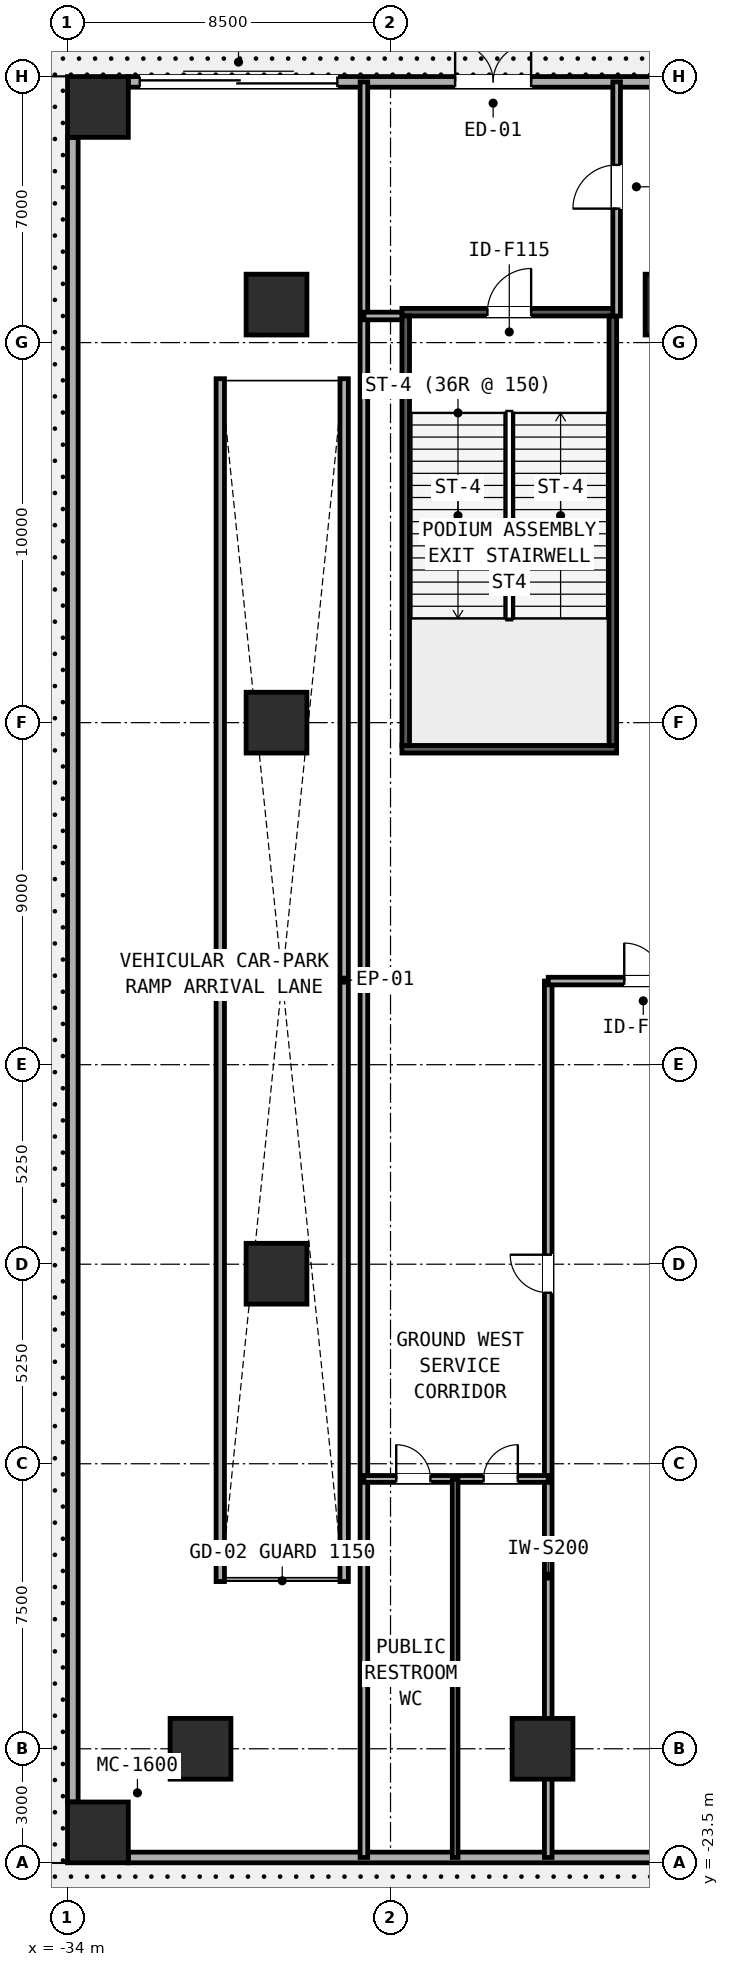
"""IFC4 building model, lengths in metres.
Left out: names, types, materials, properties, quantities, classifications, styles, units other than length and angle.
Written with IfcOpenShell. Run it as: python <this file> out.ifc"""

import sys

from ifc_helpers import new_model, si_unit, direction, frame, frame_2d, origin, origin_2d, place, context, subcontext, project, spatial, rectangle, extrude, element, fill, save


model = new_model("IFC4")
c1 = context("Model", 3, precision=1e-05, world=origin(), true_north=direction((0.0, 1.0)))
c2 = subcontext(c1, "Body", "Model", "MODEL_VIEW")
j1 = project(units=[si_unit("LENGTHUNIT", "METRE"), si_unit("PLANEANGLEUNIT", "RADIAN")], contexts=[c1])
p1 = place(None, origin())
s1 = spatial("IfcSite", under=j1, at=p1, CompositionType="ELEMENT")
p2 = place(p1, origin())
s2 = spatial("IfcBuilding", under=s1, at=p2, CompositionType="ELEMENT")
p3 = place(p2, origin())
s3 = spatial("IfcBuildingStorey", under=s2, at=p3, CompositionType="ELEMENT", Elevation=0.0)
p4 = place(p3, frame((-25.2, 5.8, 0.0), z_axis=(0.0, 0.0, 1.0), x_axis=(1.0, 0.0, 0.0)))
e1 = element("IfcWall", 1, at=p4, inside=s3, PredefinedType="SOLIDWALL", context=c2, shape_type="SweptSolid", body=[
    extrude(rectangle(XDim=5.65, YDim=0.2, at=frame_2d((2.825, 0.0))), origin(), (0.0, 0.0, 1.0), 5.1),
])
p5 = place(p3, frame((-25.2, 17.3, 0.0), z_axis=(0.0, 0.0, 1.0), x_axis=(1.0, 0.0, 0.0)))
e2 = element("IfcWall", 2, at=p5, inside=s3, PredefinedType="SOLIDWALL", context=c2, shape_type="SweptSolid", body=[
    extrude(rectangle(XDim=5.65, YDim=0.2, at=frame_2d((2.825, 0.0))), origin(), (0.0, 0.0, 1.0), 5.1),
])
p6 = place(p5, frame((2.25, 0.0, 0.0)))
e3 = element("IfcOpeningElement", 3, at=p6, cuts=e2, PredefinedType="OPENING", context=c2, shape_type="SweptSolid", body=[
    extrude(rectangle(XDim=1.15, YDim=2.2, at=frame_2d((0.575, 1.1))), frame((0.0, 0.11, 0.0), z_axis=(0.0, -1.0, 0.0), x_axis=(1.0, 0.0, 0.0)), (0.0, 0.0, 1.0), 0.22),
])
for number, where, z_axis, x_axis in (
    (4, (-25.1, 5.9, 0.0), (0.0, 0.0, 1.0), (0.0, 1.0, 0.0)),
    (5, (-19.65, 5.9, 0.0), (0.0, 0.0, 1.0), (0.0, 1.0, 0.0)),
):
    element("IfcWall", number, at=place(p3, frame(where, z_axis=z_axis, x_axis=x_axis)), inside=s3, PredefinedType="SOLIDWALL", context=c2, shape_type="SweptSolid", body=[
        extrude(rectangle(XDim=11.3, YDim=0.2, at=frame_2d((5.65, 0.0))), origin(), (0.0, 0.0, 1.0), 5.1),
    ])
for number, where, z_axis, x_axis in (
    (6, (-33.2, -22.7, 0.0), (0.0, 0.0, 1.0), (1.0, 0.0, 0.0)),
    (7, (-33.2, 22.7, 0.0), (0.0, 0.0, 1.0), (1.0, 0.0, 0.0)),
    (8, (-30.5, -20.5, 0.0), (0.0, 0.0, 1.0), (1.0, 0.0, 0.0)),
    (9, (-21.5, -20.5, 0.0), (0.0, 0.0, 1.0), (1.0, 0.0, 0.0)),
    (10, (-28.5, -8.0, 0.0), (0.0, 0.0, 1.0), (1.0, 0.0, 0.0)),
    (11, (-28.5, 6.5, 0.0), (0.0, 0.0, 1.0), (1.0, 0.0, 0.0)),
    (12, (-28.5, 17.5, 0.0), (0.0, 0.0, 1.0), (1.0, 0.0, 0.0)),
    (13, (-18.0, 17.5, 0.0), (0.0, 0.0, 1.0), (1.0, 0.0, 0.0)),
):
    element("IfcColumn", number, at=place(p3, frame(where, z_axis=z_axis, x_axis=x_axis)), inside=s3, PredefinedType="COLUMN", context=c2, shape_type="SweptSolid", body=[
        extrude(rectangle(XDim=1.6, YDim=1.6, at=origin_2d()), origin(), (0.0, 0.0, 1.0), 5.4),
    ])
p7 = place(p3, frame((-32.4, -23.36, 0.0), z_axis=(0.0, 0.0, 1.0), x_axis=(1.0, 0.0, 0.0)))
e14 = element("IfcWall", 14, at=p7, inside=s3, PredefinedType="STANDARD", context=c2, shape_type="SweptSolid", body=[
    extrude(rectangle(XDim=64.8, YDim=0.28, at=frame_2d((32.4, 0.0))), origin(), (0.0, 0.0, 1.0), 5.1),
])
p8 = place(p7, frame((16.9, 0.0, 0.0)))
e15 = element("IfcOpeningElement", 15, at=p8, cuts=e14, PredefinedType="OPENING", context=c2, shape_type="SweptSolid", body=[
    extrude(rectangle(XDim=2.0, YDim=2.35, at=frame_2d((1.0, 1.175))), frame((0.0, 0.15, 0.0), z_axis=(0.0, -1.0, 0.0), x_axis=(1.0, 0.0, 0.0)), (0.0, 0.0, 1.0), 0.3),
])
p9 = place(p7, frame((45.9, 0.0, 0.0)))
e16 = element("IfcOpeningElement", 16, at=p9, cuts=e14, PredefinedType="OPENING", context=c2, shape_type="SweptSolid", body=[
    extrude(rectangle(XDim=2.0, YDim=2.35, at=frame_2d((1.0, 1.175))), frame((0.0, 0.15, 0.0), z_axis=(0.0, -1.0, 0.0), x_axis=(1.0, 0.0, 0.0)), (0.0, 0.0, 1.0), 0.3),
])
p10 = place(p3, frame((-32.4, 23.36, 0.0), z_axis=(0.0, 0.0, 1.0), x_axis=(1.0, 0.0, 0.0)))
e17 = element("IfcWall", 17, at=p10, inside=s3, PredefinedType="STANDARD", context=c2, shape_type="SweptSolid", body=[
    extrude(rectangle(XDim=64.8, YDim=0.28, at=frame_2d((32.4, 0.0))), origin(), (0.0, 0.0, 1.0), 5.1),
])
p11 = place(p10, frame((8.6, 0.0, 0.0)))
e18 = element("IfcOpeningElement", 18, at=p11, cuts=e17, PredefinedType="OPENING", context=c2, shape_type="SweptSolid", body=[
    extrude(rectangle(XDim=2.0, YDim=2.35, at=frame_2d((1.0, 1.175))), frame((0.0, 0.15, 0.0), z_axis=(0.0, -1.0, 0.0), x_axis=(1.0, 0.0, 0.0)), (0.0, 0.0, 1.0), 0.3),
])
p12 = place(p10, frame((26.9, 0.0, 0.0)))
e19 = element("IfcOpeningElement", 19, at=p12, cuts=e17, PredefinedType="OPENING", context=c2, shape_type="SweptSolid", body=[
    extrude(rectangle(XDim=2.0, YDim=2.35, at=frame_2d((1.0, 1.175))), frame((0.0, 0.15, 0.0), z_axis=(0.0, -1.0, 0.0), x_axis=(1.0, 0.0, 0.0)), (0.0, 0.0, 1.0), 0.3),
])
p13 = place(p10, frame((35.9, 0.0, 0.0)))
e20 = element("IfcOpeningElement", 20, at=p13, cuts=e17, PredefinedType="OPENING", context=c2, shape_type="SweptSolid", body=[
    extrude(rectangle(XDim=2.0, YDim=2.35, at=frame_2d((1.0, 1.175))), frame((0.0, 0.15, 0.0), z_axis=(0.0, -1.0, 0.0), x_axis=(1.0, 0.0, 0.0)), (0.0, 0.0, 1.0), 0.3),
])
p14 = place(p10, frame((47.9, 0.0, 0.0)))
e21 = element("IfcOpeningElement", 21, at=p14, cuts=e17, PredefinedType="OPENING", context=c2, shape_type="SweptSolid", body=[
    extrude(rectangle(XDim=2.0, YDim=2.35, at=frame_2d((1.0, 1.175))), frame((0.0, 0.15, 0.0), z_axis=(0.0, -1.0, 0.0), x_axis=(1.0, 0.0, 0.0)), (0.0, 0.0, 1.0), 0.3),
])
p15 = place(p10, frame((61.2, 0.0, 0.0)))
e22 = element("IfcOpeningElement", 22, at=p15, cuts=e17, PredefinedType="OPENING", context=c2, shape_type="SweptSolid", body=[
    extrude(rectangle(XDim=2.0, YDim=2.35, at=frame_2d((1.0, 1.175))), frame((0.0, 0.15, 0.0), z_axis=(0.0, -1.0, 0.0), x_axis=(1.0, 0.0, 0.0)), (0.0, 0.0, 1.0), 0.3),
])
p16 = place(p10, frame((0.3, 0.0, 0.0)))
e23 = element("IfcOpeningElement", 23, at=p16, cuts=e17, PredefinedType="OPENING", context=c2, shape_type="SweptSolid", body=[
    extrude(rectangle(XDim=5.2, YDim=3.1, at=frame_2d((2.6, 1.55))), frame((0.0, 0.15, 0.0), z_axis=(0.0, -1.0, 0.0), x_axis=(1.0, 0.0, 0.0)), (0.0, 0.0, 1.0), 0.3),
])
p17 = place(p10, frame((16.2, 0.0, 0.85)))
e24 = element("IfcOpeningElement", 24, at=p17, cuts=e17, PredefinedType="OPENING", context=c2, shape_type="SweptSolid", body=[
    extrude(rectangle(XDim=2.4, YDim=2.1, at=frame_2d((1.2, 1.05))), frame((0.0, 0.15, 0.0), z_axis=(0.0, -1.0, 0.0), x_axis=(1.0, 0.0, 0.0)), (0.0, 0.0, 1.0), 0.3),
])
p18 = place(p10, frame((31.2, 0.0, 0.85)))
e25 = element("IfcOpeningElement", 25, at=p18, cuts=e17, PredefinedType="OPENING", context=c2, shape_type="SweptSolid", body=[
    extrude(rectangle(XDim=2.4, YDim=2.1, at=frame_2d((1.2, 1.05))), frame((0.0, 0.15, 0.0), z_axis=(0.0, -1.0, 0.0), x_axis=(1.0, 0.0, 0.0)), (0.0, 0.0, 1.0), 0.3),
])
p19 = place(p10, frame((40.7, 0.0, 0.85)))
e26 = element("IfcOpeningElement", 26, at=p19, cuts=e17, PredefinedType="OPENING", context=c2, shape_type="SweptSolid", body=[
    extrude(rectangle(XDim=2.4, YDim=2.1, at=frame_2d((1.2, 1.05))), frame((0.0, 0.15, 0.0), z_axis=(0.0, -1.0, 0.0), x_axis=(1.0, 0.0, 0.0)), (0.0, 0.0, 1.0), 0.3),
])
p20 = place(p10, frame((54.7, 0.0, 0.85)))
e27 = element("IfcOpeningElement", 27, at=p20, cuts=e17, PredefinedType="OPENING", context=c2, shape_type="SweptSolid", body=[
    extrude(rectangle(XDim=2.4, YDim=2.1, at=frame_2d((1.2, 1.05))), frame((0.0, 0.15, 0.0), z_axis=(0.0, -1.0, 0.0), x_axis=(1.0, 0.0, 0.0)), (0.0, 0.0, 1.0), 0.3),
])
p21 = place(p3, frame((-33.86, -21.9, 0.0), z_axis=(0.0, 0.0, 1.0), x_axis=(0.0, 1.0, 0.0)))
e28 = element("IfcWall", 28, at=p21, inside=s3, PredefinedType="STANDARD", context=c2, shape_type="SweptSolid", body=[
    extrude(rectangle(XDim=43.8, YDim=0.28, at=frame_2d((21.9, 0.0))), origin(), (0.0, 0.0, 1.0), 5.1),
])
for number, where, z_axis, x_axis in (
    (29, (-29.98, -16.1, 0.0), (0.0, 0.0, 1.0), (0.0, 1.0, 0.0)),
    (30, (-26.72, -16.1, 0.0), (0.0, 0.0, 1.0), (0.0, 1.0, 0.0)),
):
    element("IfcWall", number, at=place(p3, frame(where, z_axis=z_axis, x_axis=x_axis)), inside=s3, PredefinedType="PARAPET", context=c2, shape_type="SweptSolid", body=[
        extrude(rectangle(XDim=31.65, YDim=0.22, at=frame_2d((15.825, 0.0))), origin(), (0.0, 0.0, 1.0), 1.15),
    ])
p22 = place(p3, frame((-21.35, -23.36, 0.0), z_axis=(0.0, 0.0, 1.0), x_axis=(0.0, 1.0, 0.0)))
e31 = element("IfcWall", 31, at=p22, inside=s3, PredefinedType="PARTITIONING", context=c2, shape_type="SweptSolid", body=[
    extrude(rectangle(XDim=23.06, YDim=0.2, at=frame_2d((11.53, 0.0))), origin(), (0.0, 0.0, 1.0), 4.229),
])
p23 = place(p22, frame((14.86, 0.0, 0.0)))
e32 = element("IfcOpeningElement", 32, at=p23, cuts=e31, PredefinedType="OPENING", context=c2, shape_type="SweptSolid", body=[
    extrude(rectangle(XDim=1.0, YDim=2.1, at=frame_2d((0.5, 1.05))), frame((0.0, 0.11, 0.0), z_axis=(0.0, -1.0, 0.0), x_axis=(1.0, 0.0, 0.0)), (0.0, 0.0, 1.0), 0.22),
])
p24 = place(p3, frame((-21.35, -0.3, 0.0), z_axis=(0.0, 0.0, 1.0), x_axis=(1.0, 0.0, 0.0)))
e33 = element("IfcWall", 33, at=p24, inside=s3, PredefinedType="PARTITIONING", context=c2, shape_type="SweptSolid", body=[
    extrude(rectangle(XDim=13.3, YDim=0.2, at=frame_2d((6.65, 0.0))), origin(), (0.0, 0.0, 1.0), 4.229),
])
p25 = place(p24, frame((2.0, 0.0, 0.0)))
e34 = element("IfcOpeningElement", 34, at=p25, cuts=e33, PredefinedType="OPENING", context=c2, shape_type="SweptSolid", body=[
    extrude(rectangle(XDim=1.0, YDim=2.1, at=frame_2d((0.5, 1.05))), frame((0.0, 0.11, 0.0), z_axis=(0.0, -1.0, 0.0), x_axis=(1.0, 0.0, 0.0)), (0.0, 0.0, 1.0), 0.22),
])
p26 = place(p3, frame((-26.2, -23.36, 0.0), z_axis=(0.0, 0.0, 1.0), x_axis=(0.0, 1.0, 0.0)))
e35 = element("IfcWall", 35, at=p26, inside=s3, PredefinedType="PARTITIONING", context=c2, shape_type="SweptSolid", body=[
    extrude(rectangle(XDim=46.72, YDim=0.2, at=frame_2d((23.36, 0.0))), origin(), (0.0, 0.0, 1.0), 4.229),
])
p27 = place(p3, frame((-19.55, 17.2, 0.0), z_axis=(0.0, 0.0, 1.0), x_axis=(0.0, 1.0, 0.0)))
e36 = element("IfcWall", 36, at=p27, inside=s3, PredefinedType="PARTITIONING", context=c2, shape_type="SweptSolid", body=[
    extrude(rectangle(XDim=6.16, YDim=0.2, at=frame_2d((3.08, 0.0))), origin(), (0.0, 0.0, 1.0), 4.312),
])
p28 = place(p27, frame((2.825, 0.0, 0.0)))
e37 = element("IfcOpeningElement", 37, at=p28, cuts=e36, PredefinedType="OPENING", context=c2, shape_type="SweptSolid", body=[
    extrude(rectangle(XDim=1.15, YDim=2.2, at=frame_2d((0.575, 1.1))), frame((0.0, 0.11, 0.0), z_axis=(0.0, -1.0, 0.0), x_axis=(1.0, 0.0, 0.0)), (0.0, 0.0, 1.0), 0.22),
])
p29 = place(p3, frame((-26.2, 17.2, 0.0), z_axis=(0.0, 0.0, 1.0), x_axis=(1.0, 0.0, 0.0)))
e38 = element("IfcWall", 38, at=p29, inside=s3, PredefinedType="PARTITIONING", context=c2, shape_type="SweptSolid", body=[
    extrude(rectangle(XDim=1.0, YDim=0.2, at=frame_2d((0.5, 0.0))), origin(), (0.0, 0.0, 1.0), 4.312),
])
p30 = place(p3, frame((-26.2, -13.4, 0.0), z_axis=(0.0, 0.0, 1.0), x_axis=(1.0, 0.0, 0.0)))
e39 = element("IfcWall", 39, at=p30, inside=s3, PredefinedType="PARTITIONING", context=c2, shape_type="SweptSolid", body=[
    extrude(rectangle(XDim=4.85, YDim=0.18, at=frame_2d((2.425, 0.0))), origin(), (0.0, 0.0, 1.0), 4.55),
])
p31 = place(p30, frame((0.85, 0.0, 0.0)))
e40 = element("IfcOpeningElement", 40, at=p31, cuts=e39, PredefinedType="OPENING", context=c2, shape_type="SweptSolid", body=[
    extrude(rectangle(XDim=0.9, YDim=2.1, at=frame_2d((0.45, 1.05))), frame((0.0, 0.1, 0.0), z_axis=(0.0, -1.0, 0.0), x_axis=(1.0, 0.0, 0.0)), (0.0, 0.0, 1.0), 0.2),
])
p32 = place(p30, frame((3.15, 0.0, 0.0)))
e41 = element("IfcOpeningElement", 41, at=p32, cuts=e39, PredefinedType="OPENING", context=c2, shape_type="SweptSolid", body=[
    extrude(rectangle(XDim=0.9, YDim=2.1, at=frame_2d((0.45, 1.05))), frame((0.0, 0.1, 0.0), z_axis=(0.0, -1.0, 0.0), x_axis=(1.0, 0.0, 0.0)), (0.0, 0.0, 1.0), 0.2),
])
p33 = place(p3, frame((-23.8, -23.36, 0.0), z_axis=(0.0, 0.0, 1.0), x_axis=(0.0, 1.0, 0.0)))
e42 = element("IfcWall", 42, at=p33, inside=s3, PredefinedType="PARTITIONING", context=c2, shape_type="SweptSolid", body=[
    extrude(rectangle(XDim=9.96, YDim=0.15, at=frame_2d((4.98, 0.0))), origin(), (0.0, 0.0, 1.0), 4.312),
])
p34 = place(p11, origin())
e43 = element("IfcDoor", 43, at=p34, inside=s3, OperationType="DOUBLE_DOOR_SINGLE_SWING", PredefinedType="DOOR", context=c2, shape_type="SweptSolid", body=[
    extrude(rectangle(XDim=2.0, YDim=2.35, at=frame_2d((1.0, 1.175))), frame((0.0, 0.025, 0.0), z_axis=(0.0, -1.0, 0.0), x_axis=(1.0, 0.0, 0.0)), (0.0, 0.0, 1.0), 0.05),
])
fill(e18, e43)
p35 = place(p16, origin())
e44 = element("IfcDoor", 44, at=p35, inside=s3, OperationType="ROLLINGUP", PredefinedType="GATE", context=c2, shape_type="SweptSolid", body=[
    extrude(rectangle(XDim=5.2, YDim=3.1, at=frame_2d((2.6, 1.55))), frame((0.0, 0.025, 0.0), z_axis=(0.0, -1.0, 0.0), x_axis=(1.0, 0.0, 0.0)), (0.0, 0.0, 1.0), 0.05),
])
fill(e23, e44)
p36 = place(p6, origin())
e45 = element("IfcDoor", 45, at=p36, inside=s3, OperationType="SINGLE_SWING_RIGHT", PredefinedType="DOOR", context=c2, shape_type="SweptSolid", body=[
    extrude(rectangle(XDim=1.15, YDim=2.2, at=frame_2d((0.575, 1.1))), frame((0.0, 0.025, 0.0), z_axis=(0.0, -1.0, 0.0), x_axis=(1.0, 0.0, 0.0)), (0.0, 0.0, 1.0), 0.05),
])
fill(e3, e45)
p37 = place(p25, frame((1.0, 0.0, 0.0), z_axis=(0.0, 0.0, 1.0), x_axis=(-1.0, 0.0, 0.0)))
e46 = element("IfcDoor", 46, at=p37, inside=s3, OperationType="SINGLE_SWING_LEFT", PredefinedType="DOOR", context=c2, shape_type="SweptSolid", body=[
    extrude(rectangle(XDim=1.0, YDim=2.1, at=frame_2d((0.5, 1.05))), frame((0.0, 0.025, 0.0), z_axis=(0.0, -1.0, 0.0), x_axis=(1.0, 0.0, 0.0)), (0.0, 0.0, 1.0), 0.05),
])
fill(e34, e46)
p38 = place(p28, frame((1.15, 0.0, 0.0), z_axis=(0.0, 0.0, 1.0), x_axis=(-1.0, 0.0, 0.0)))
e47 = element("IfcDoor", 47, at=p38, inside=s3, OperationType="SINGLE_SWING_LEFT", PredefinedType="DOOR", context=c2, shape_type="SweptSolid", body=[
    extrude(rectangle(XDim=1.15, YDim=2.2, at=frame_2d((0.575, 1.1))), frame((0.0, 0.025, 0.0), z_axis=(0.0, -1.0, 0.0), x_axis=(1.0, 0.0, 0.0)), (0.0, 0.0, 1.0), 0.05),
])
fill(e37, e47)
p39 = place(p31, frame((0.9, 0.0, 0.0), z_axis=(0.0, 0.0, 1.0), x_axis=(-1.0, 0.0, 0.0)))
e48 = element("IfcDoor", 48, at=p39, inside=s3, OperationType="SINGLE_SWING_LEFT", PredefinedType="DOOR", context=c2, shape_type="SweptSolid", body=[
    extrude(rectangle(XDim=0.9, YDim=2.1, at=frame_2d((0.45, 1.05))), frame((0.0, 0.025, 0.0), z_axis=(0.0, -1.0, 0.0), x_axis=(1.0, 0.0, 0.0)), (0.0, 0.0, 1.0), 0.05),
])
fill(e40, e48)
p40 = place(p32, frame((0.9, 0.0, 0.0), z_axis=(0.0, 0.0, 1.0), x_axis=(-1.0, 0.0, 0.0)))
e49 = element("IfcDoor", 49, at=p40, inside=s3, OperationType="SINGLE_SWING_RIGHT", PredefinedType="DOOR", context=c2, shape_type="SweptSolid", body=[
    extrude(rectangle(XDim=0.9, YDim=2.1, at=frame_2d((0.45, 1.05))), frame((0.0, 0.025, 0.0), z_axis=(0.0, -1.0, 0.0), x_axis=(1.0, 0.0, 0.0)), (0.0, 0.0, 1.0), 0.05),
])
fill(e41, e49)
p41 = place(p23, origin())
e50 = element("IfcDoor", 50, at=p41, inside=s3, OperationType="SINGLE_SWING_RIGHT", PredefinedType="DOOR", context=c2, shape_type="SweptSolid", body=[
    extrude(rectangle(XDim=1.0, YDim=2.1, at=frame_2d((0.5, 1.05))), frame((0.0, 0.025, 0.0), z_axis=(0.0, -1.0, 0.0), x_axis=(1.0, 0.0, 0.0)), (0.0, 0.0, 1.0), 0.05),
])
fill(e32, e50)
save(model, sys.argv[1])
